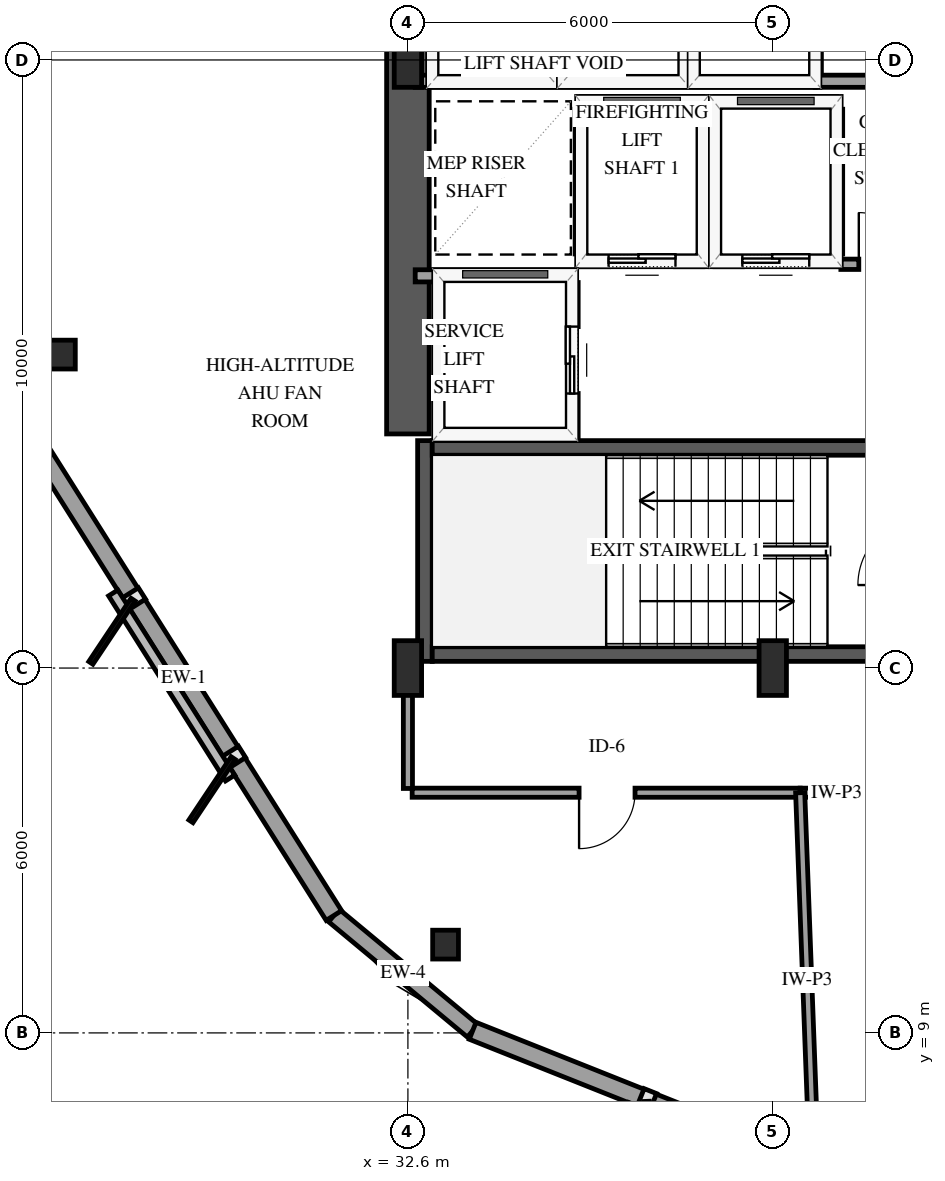
"""IFC4 building model, lengths in metres.
Left out: names, types, materials, properties, quantities, classifications, styles, units other than length and angle.
Written with IfcOpenShell. Run it as: python <this file> out.ifc"""

import sys

from ifc_helpers import new_model, si_unit, direction, frame, frame_2d, origin, origin_2d, place, context, subcontext, project, spatial, rectangle, i_section, extrude, element, fill, save


model = new_model("IFC4")
c1 = context("Model", 3, precision=1e-05, world=origin(), true_north=direction((0.0, 1.0)))
c2 = subcontext(c1, "Body", "Model", "MODEL_VIEW")
j1 = project(units=[si_unit("LENGTHUNIT", "METRE"), si_unit("PLANEANGLEUNIT", "RADIAN")], contexts=[c1])
p1 = place(None, origin())
s1 = spatial("IfcSite", under=j1, at=p1, CompositionType="ELEMENT")
p2 = place(p1, origin())
s2 = spatial("IfcBuilding", under=s1, at=p2, CompositionType="ELEMENT")
p3 = place(p2, frame((0.0, 0.0, 82.6)))
s3 = spatial("IfcBuildingStorey", under=s2, at=p3, CompositionType="ELEMENT", Elevation=82.6)
p4 = place(p3, frame((32.88, 15.11, 0.0), z_axis=(0.0, 0.0, 1.0), x_axis=(0.0, 1.0, 0.0)))
e1 = element("IfcWall", 1, at=p4, inside=s3, PredefinedType="SHEAR", context=c2, shape_type="SweptSolid", body=[
    extrude(rectangle(XDim=3.63, YDim=0.24, at=frame_2d((1.815, 0.0))), origin(), (0.0, 0.0, 1.0), 4.8),
])
for number, where, z_axis, x_axis in (
    (2, (33.0, 15.23, 0.0), (0.0, 0.0, 1.0), (1.0, 0.0, 0.0)),
    (3, (33.0, 18.62, 0.0), (0.0, 0.0, 1.0), (1.0, 0.0, 0.0)),
):
    element("IfcWall", number, at=place(p3, frame(where, z_axis=z_axis, x_axis=x_axis)), inside=s3, PredefinedType="SHEAR", context=c2, shape_type="SweptSolid", body=[
        extrude(rectangle(XDim=8.0, YDim=0.24, at=frame_2d((4.0, 0.0))), origin(), (0.0, 0.0, 1.0), 4.8),
    ])
p5 = place(p3, frame((32.6, 18.85, 0.0), z_axis=(0.0, 0.0, 1.0), x_axis=(0.0, 1.0, 0.0)))
e4 = element("IfcWall", 4, at=p5, inside=s3, PredefinedType="SHEAR", context=c2, shape_type="SweptSolid", body=[
    extrude(rectangle(XDim=12.3, YDim=0.7, at=frame_2d((6.15, 0.0))), origin(), (0.0, 0.0, 1.0), 4.8),
])
for number, where, z_axis, x_axis in (
    (5, (32.6, 15.0, 0.0), (0.0, 0.0, 1.0), (1.0, 0.0, 0.0)),
    (6, (32.6, 25.0, 0.0), (0.0, 0.0, 1.0), (1.0, 0.0, 0.0)),
    (7, (38.6, 15.0, 0.0), (0.0, 0.0, 1.0), (1.0, 0.0, 0.0)),
):
    element("IfcColumn", number, at=place(p3, frame(where, z_axis=z_axis, x_axis=x_axis)), inside=s3, PredefinedType="PILASTER", context=c2, shape_type="SweptSolid", body=[
        extrude(rectangle(XDim=0.45, YDim=0.9, at=origin_2d()), origin(), (0.0, 0.0, 1.0), 4.5),
    ])
for number, where, z_axis, x_axis in (
    (8, (26.918, 20.155, 0.0), (0.0, 0.0, 1.0), (1.0, 0.0, 0.0)),
    (9, (33.219, 10.452, 0.0), (0.0, 0.0, 1.0), (1.0, 0.0, 0.0)),
):
    element("IfcColumn", number, at=place(p3, frame(where, z_axis=z_axis, x_axis=x_axis)), inside=s3, PredefinedType="COLUMN", context=c2, shape_type="SweptSolid", body=[
        extrude(i_section(OverallWidth=0.424, OverallDepth=0.474, WebThickness=0.048, FlangeThickness=0.077, FilletRadius=0.038, at=origin_2d()), origin(), (0.0, 0.0, 1.0), 4.5),
    ])
p6 = place(p3, frame((31.383, 10.931, 0.0), z_axis=(0.0, 0.0, 1.0), x_axis=(0.769198462911, -0.639009956617, 0.0)))
e10 = element("IfcWall", 10, at=p6, inside=s3, PredefinedType="SOLIDWALL", context=c2, shape_type="SweptSolid", body=[
    extrude(rectangle(XDim=2.967, YDim=0.27, at=frame_2d((1.483, 0.0))), origin(), (0.0, 0.0, 1.0), 3.879),
])
p7 = place(p3, frame((26.445, 18.747, 0.0), z_axis=(0.0, 0.0, 1.0), x_axis=(0.534049623652, -0.845453132632, 0.0)))
e11 = element("IfcWall", 11, at=p7, inside=s3, PredefinedType="SOLIDWALL", context=c2, shape_type="SweptSolid", body=[
    extrude(rectangle(XDim=9.245, YDim=0.3, at=frame_2d((4.623, 0.0))), origin(), (0.0, 0.0, 1.0), 3.879),
])
p8 = place(p3, frame((33.665, 9.035, 0.0), z_axis=(0.0, 0.0, 1.0), x_axis=(0.929000278628, -0.370079021709, 0.0)))
e12 = element("IfcWall", 12, at=p8, inside=s3, PredefinedType="SOLIDWALL", context=c2, shape_type="SweptSolid", body=[
    extrude(rectangle(XDim=9.245, YDim=0.3, at=frame_2d((4.623, 0.0))), origin(), (0.0, 0.0, 1.0), 3.879),
])
p9 = place(p3, frame((35.45, 21.7, 0.0), z_axis=(0.0, 0.0, 1.0), x_axis=(1.0, 0.0, 0.0)))
e13 = element("IfcWall", 13, at=p9, inside=s3, PredefinedType="SOLIDWALL", context=c2, shape_type="SweptSolid", body=[
    extrude(rectangle(XDim=2.0, YDim=0.2, at=frame_2d((1.0, 0.0))), origin(), (0.0, 0.0, 1.0), 4.5),
])
p10 = place(p9, frame((0.45, 0.0, 0.0)))
e14 = element("IfcOpeningElement", 14, at=p10, cuts=e13, PredefinedType="OPENING", context=c2, shape_type="SweptSolid", body=[
    extrude(rectangle(XDim=1.1, YDim=2.15, at=frame_2d((0.55, 1.075))), frame((0.0, 0.11, 0.0), z_axis=(0.0, -1.0, 0.0), x_axis=(1.0, 0.0, 0.0)), (0.0, 0.0, 1.0), 0.22),
])
p11 = place(p3, frame((35.45, 24.3, 0.0), z_axis=(0.0, 0.0, 1.0), x_axis=(1.0, 0.0, 0.0)))
e15 = element("IfcWall", 15, at=p11, inside=s3, PredefinedType="SOLIDWALL", context=c2, shape_type="SweptSolid", body=[
    extrude(rectangle(XDim=2.0, YDim=0.2, at=frame_2d((1.0, 0.0))), origin(), (0.0, 0.0, 1.0), 4.5),
])
for number, where, z_axis, x_axis in (
    (16, (35.45, 21.81, 0.0), (0.0, 0.0, 1.0), (0.0, 1.0, 0.0)),
    (17, (37.45, 21.81, 0.0), (0.0, 0.0, 1.0), (0.0, 1.0, 0.0)),
):
    element("IfcWall", number, at=place(p3, frame(where, z_axis=z_axis, x_axis=x_axis)), inside=s3, PredefinedType="SOLIDWALL", context=c2, shape_type="SweptSolid", body=[
        extrude(rectangle(XDim=2.38, YDim=0.2, at=frame_2d((1.19, 0.0))), origin(), (0.0, 0.0, 1.0), 4.5),
    ])
p12 = place(p3, frame((37.65, 21.7, 0.0), z_axis=(0.0, 0.0, 1.0), x_axis=(1.0, 0.0, 0.0)))
e18 = element("IfcWall", 18, at=p12, inside=s3, PredefinedType="SOLIDWALL", context=c2, shape_type="SweptSolid", body=[
    extrude(rectangle(XDim=2.0, YDim=0.2, at=frame_2d((1.0, 0.0))), origin(), (0.0, 0.0, 1.0), 4.5),
])
p13 = place(p12, frame((0.45, 0.0, 0.0)))
e19 = element("IfcOpeningElement", 19, at=p13, cuts=e18, PredefinedType="OPENING", context=c2, shape_type="SweptSolid", body=[
    extrude(rectangle(XDim=1.1, YDim=2.15, at=frame_2d((0.55, 1.075))), frame((0.0, 0.11, 0.0), z_axis=(0.0, -1.0, 0.0), x_axis=(1.0, 0.0, 0.0)), (0.0, 0.0, 1.0), 0.22),
])
p14 = place(p3, frame((37.65, 24.3, 0.0), z_axis=(0.0, 0.0, 1.0), x_axis=(1.0, 0.0, 0.0)))
e20 = element("IfcWall", 20, at=p14, inside=s3, PredefinedType="SOLIDWALL", context=c2, shape_type="SweptSolid", body=[
    extrude(rectangle(XDim=2.0, YDim=0.2, at=frame_2d((1.0, 0.0))), origin(), (0.0, 0.0, 1.0), 4.5),
])
p15 = place(p3, frame((39.65, 21.81, 0.0), z_axis=(0.0, 0.0, 1.0), x_axis=(0.0, 1.0, 0.0)))
e21 = element("IfcWall", 21, at=p15, inside=s3, PredefinedType="SOLIDWALL", context=c2, shape_type="SweptSolid", body=[
    extrude(rectangle(XDim=2.38, YDim=0.2, at=frame_2d((1.19, 0.0))), origin(), (0.0, 0.0, 1.0), 4.5),
])
p16 = place(p3, frame((32.72, 21.45, 0.0), z_axis=(0.0, 0.0, 1.0), x_axis=(1.0, 0.0, 0.0)))
e22 = element("IfcWall", 22, at=p16, inside=s3, PredefinedType="SOLIDWALL", context=c2, shape_type="SweptSolid", body=[
    extrude(rectangle(XDim=2.58, YDim=0.2, at=frame_2d((1.29, 0.0))), origin(), (0.0, 0.0, 1.0), 4.5),
])
p17 = place(p3, frame((35.3, 18.79, 0.0), z_axis=(0.0, 0.0, 1.0), x_axis=(0.0, 1.0, 0.0)))
e23 = element("IfcWall", 23, at=p17, inside=s3, PredefinedType="SOLIDWALL", context=c2, shape_type="SweptSolid", body=[
    extrude(rectangle(XDim=2.55, YDim=0.2, at=frame_2d((1.275, 0.0))), origin(), (0.0, 0.0, 1.0), 4.5),
])
p18 = place(p17, frame((0.725, 0.0, 0.0)))
e24 = element("IfcOpeningElement", 24, at=p18, cuts=e23, PredefinedType="OPENING", context=c2, shape_type="SweptSolid", body=[
    extrude(rectangle(XDim=1.1, YDim=2.15, at=frame_2d((0.55, 1.075))), frame((0.0, 0.11, 0.0), z_axis=(0.0, -1.0, 0.0), x_axis=(1.0, 0.0, 0.0)), (0.0, 0.0, 1.0), 0.22),
])
p19 = place(p3, frame((32.72, 24.65, 0.0), z_axis=(0.0, 0.0, 1.0), x_axis=(1.0, 0.0, 0.0)))
e25 = element("IfcWall", 25, at=p19, inside=s3, PredefinedType="SOLIDWALL", context=c2, shape_type="SweptSolid", body=[
    extrude(rectangle(XDim=2.28, YDim=0.2, at=frame_2d((1.14, 0.0))), origin(), (0.0, 0.0, 1.0), 4.5),
])
p20 = place(p3, frame((35.0, 24.76, 0.0), z_axis=(0.0, 0.0, 1.0), x_axis=(0.0, 1.0, 0.0)))
e26 = element("IfcWall", 26, at=p20, inside=s3, PredefinedType="SOLIDWALL", context=c2, shape_type="SweptSolid", body=[
    extrude(rectangle(XDim=2.08, YDim=0.2, at=frame_2d((1.04, 0.0))), origin(), (0.0, 0.0, 1.0), 4.5),
])
p21 = place(p3, frame((35.15, 24.65, 0.0), z_axis=(0.0, 0.0, 1.0), x_axis=(1.0, 0.0, 0.0)))
e27 = element("IfcWall", 27, at=p21, inside=s3, PredefinedType="SOLIDWALL", context=c2, shape_type="SweptSolid", body=[
    extrude(rectangle(XDim=2.0, YDim=0.2, at=frame_2d((1.0, 0.0))), origin(), (0.0, 0.0, 1.0), 4.5),
])
p22 = place(p3, frame((37.15, 24.76, 0.0), z_axis=(0.0, 0.0, 1.0), x_axis=(0.0, 1.0, 0.0)))
e28 = element("IfcWall", 28, at=p22, inside=s3, PredefinedType="SOLIDWALL", context=c2, shape_type="SweptSolid", body=[
    extrude(rectangle(XDim=2.08, YDim=0.2, at=frame_2d((1.04, 0.0))), origin(), (0.0, 0.0, 1.0), 4.5),
])
p23 = place(p3, frame((37.3, 24.65, 0.0), z_axis=(0.0, 0.0, 1.0), x_axis=(1.0, 0.0, 0.0)))
e29 = element("IfcWall", 29, at=p23, inside=s3, PredefinedType="SOLIDWALL", context=c2, shape_type="SweptSolid", body=[
    extrude(rectangle(XDim=2.0, YDim=0.2, at=frame_2d((1.0, 0.0))), origin(), (0.0, 0.0, 1.0), 4.5),
])
p24 = place(p3, frame((39.3, 24.76, 0.0), z_axis=(0.0, 0.0, 1.0), x_axis=(0.0, 1.0, 0.0)))
e30 = element("IfcWall", 30, at=p24, inside=s3, PredefinedType="SOLIDWALL", context=c2, shape_type="SweptSolid", body=[
    extrude(rectangle(XDim=2.08, YDim=0.2, at=frame_2d((1.04, 0.0))), origin(), (0.0, 0.0, 1.0), 4.5),
])
p25 = place(p3, frame((39.3, 24.65, 0.0), z_axis=(0.0, 0.0, 1.0), x_axis=(1.0, 0.0, 0.0)))
e31 = element("IfcWall", 31, at=p25, inside=s3, PredefinedType="SOLIDWALL", context=c2, shape_type="SweptSolid", body=[
    extrude(rectangle(XDim=2.0, YDim=0.2, at=frame_2d((1.0, 0.0))), origin(), (0.0, 0.0, 1.0), 4.5),
])
p26 = place(p3, frame((46.63, 12.95, 0.0), z_axis=(0.0, 0.0, 1.0), x_axis=(-1.0, 0.0, 0.0)))
e32 = element("IfcWall", 32, at=p26, inside=s3, PredefinedType="PARTITIONING", context=c2, shape_type="SweptSolid", body=[
    extrude(rectangle(XDim=7.579, YDim=0.15, at=frame_2d((3.79, 0.0))), origin(), (0.0, 0.0, 1.0), 4.5),
])
p27 = place(p26, frame((3.315, 0.0, 0.0)))
e33 = element("IfcOpeningElement", 33, at=p27, cuts=e32, PredefinedType="OPENING", context=c2, shape_type="SweptSolid", body=[
    extrude(rectangle(XDim=0.92, YDim=2.12, at=frame_2d((0.46, 1.06))), frame((0.0, 0.085, 0.0), z_axis=(0.0, -1.0, 0.0), x_axis=(1.0, 0.0, 0.0)), (0.0, 0.0, 1.0), 0.17),
])
p28 = place(p3, frame((39.051, 12.95, 0.0), z_axis=(0.0, 0.0, 1.0), x_axis=(-1.0, 0.0, 0.0)))
e34 = element("IfcWall", 34, at=p28, inside=s3, PredefinedType="PARTITIONING", context=c2, shape_type="SweptSolid", body=[
    extrude(rectangle(XDim=6.381, YDim=0.15, at=frame_2d((3.19, 0.0))), origin(), (0.0, 0.0, 1.0), 4.5),
])
p29 = place(p28, frame((2.716, 0.0, 0.0)))
e35 = element("IfcOpeningElement", 35, at=p29, cuts=e34, PredefinedType="OPENING", context=c2, shape_type="SweptSolid", body=[
    extrude(rectangle(XDim=0.92, YDim=2.12, at=frame_2d((0.46, 1.06))), frame((0.0, 0.085, 0.0), z_axis=(0.0, -1.0, 0.0), x_axis=(1.0, 0.0, 0.0)), (0.0, 0.0, 1.0), 0.17),
])
p30 = place(p3, frame((39.051, 12.95, 0.0), z_axis=(0.0, 0.0, 1.0), x_axis=(0.037357823621, -0.999301952872, 0.0)))
e36 = element("IfcWall", 36, at=p30, inside=s3, PredefinedType="PARTITIONING", context=c2, shape_type="SweptSolid", body=[
    extrude(rectangle(XDim=6.156, YDim=0.15, at=frame_2d((3.078, 0.0))), origin(), (0.0, 0.0, 1.0), 4.5),
])
p31 = place(p3, frame((32.6, 13.02, 0.0), z_axis=(0.0, 0.0, 1.0), x_axis=(0.0, 1.0, 0.0)))
e37 = element("IfcWall", 37, at=p31, inside=s3, PredefinedType="PARTITIONING", context=c2, shape_type="SweptSolid", body=[
    extrude(rectangle(XDim=1.86, YDim=0.15, at=frame_2d((0.93, 0.0))), origin(), (0.0, 0.0, 1.0), 4.5),
])
p32 = place(p3, frame((39.72, 21.64, 0.0), z_axis=(0.0, 0.0, 1.0), x_axis=(1.0, 0.0, 0.0)))
e38 = element("IfcWall", 38, at=p32, inside=s3, PredefinedType="PARTITIONING", context=c2, shape_type="SweptSolid", body=[
    extrude(rectangle(XDim=1.44, YDim=0.17, at=frame_2d((0.72, 0.0))), origin(), (0.0, 0.0, 1.0), 4.5),
])
p33 = place(p32, frame((0.295, 0.0, 0.0)))
e39 = element("IfcOpeningElement", 39, at=p33, cuts=e38, PredefinedType="OPENING", context=c2, shape_type="SweptSolid", body=[
    extrude(rectangle(XDim=0.85, YDim=2.1, at=frame_2d((0.425, 1.05))), frame((0.0, 0.095, 0.0), z_axis=(0.0, -1.0, 0.0), x_axis=(1.0, 0.0, 0.0)), (0.0, 0.0, 1.0), 0.19),
])
p34 = place(p10, origin())
e40 = element("IfcDoor", 40, at=p34, inside=s3, OperationType="SLIDING_TO_LEFT", PredefinedType="DOOR", context=c2, shape_type="SweptSolid", body=[
    extrude(rectangle(XDim=1.1, YDim=2.15, at=frame_2d((0.55, 1.075))), frame((0.0, 0.025, 0.0), z_axis=(0.0, -1.0, 0.0), x_axis=(1.0, 0.0, 0.0)), (0.0, 0.0, 1.0), 0.05),
])
fill(e14, e40)
p35 = place(p13, origin())
e41 = element("IfcDoor", 41, at=p35, inside=s3, OperationType="SLIDING_TO_LEFT", PredefinedType="DOOR", context=c2, shape_type="SweptSolid", body=[
    extrude(rectangle(XDim=1.1, YDim=2.15, at=frame_2d((0.55, 1.075))), frame((0.0, 0.025, 0.0), z_axis=(0.0, -1.0, 0.0), x_axis=(1.0, 0.0, 0.0)), (0.0, 0.0, 1.0), 0.05),
])
fill(e19, e41)
p36 = place(p18, origin())
e42 = element("IfcDoor", 42, at=p36, inside=s3, OperationType="SLIDING_TO_LEFT", PredefinedType="DOOR", context=c2, shape_type="SweptSolid", body=[
    extrude(rectangle(XDim=1.1, YDim=2.15, at=frame_2d((0.55, 1.075))), frame((0.0, 0.025, 0.0), z_axis=(0.0, -1.0, 0.0), x_axis=(1.0, 0.0, 0.0)), (0.0, 0.0, 1.0), 0.05),
])
fill(e24, e42)
p37 = place(p29, origin())
e43 = element("IfcDoor", 43, at=p37, inside=s3, OperationType="SINGLE_SWING_RIGHT", PredefinedType="DOOR", context=c2, shape_type="SweptSolid", body=[
    extrude(rectangle(XDim=0.92, YDim=2.12, at=frame_2d((0.46, 1.06))), frame((0.0, 0.025, 0.0), z_axis=(0.0, -1.0, 0.0), x_axis=(1.0, 0.0, 0.0)), (0.0, 0.0, 1.0), 0.05),
])
fill(e35, e43)
p38 = place(p33, origin())
e44 = element("IfcDoor", 44, at=p38, inside=s3, OperationType="SINGLE_SWING_LEFT", PredefinedType="DOOR", context=c2, shape_type="SweptSolid", body=[
    extrude(rectangle(XDim=0.85, YDim=2.1, at=frame_2d((0.425, 1.05))), frame((0.0, 0.025, 0.0), z_axis=(0.0, -1.0, 0.0), x_axis=(1.0, 0.0, 0.0)), (0.0, 0.0, 1.0), 0.05),
])
fill(e39, e44)
save(model, sys.argv[1])
